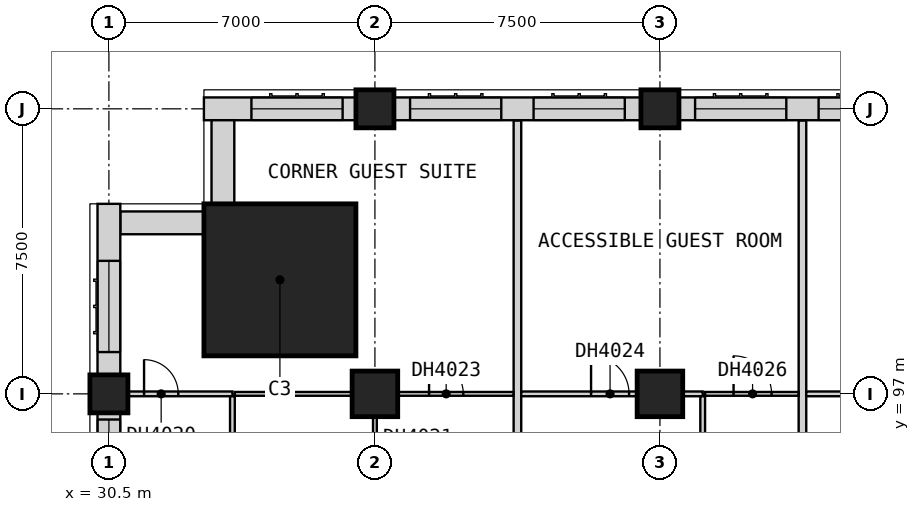
"""IFC4 building model, lengths in metres.
Left out: names, types, materials, properties, quantities, classifications, styles, units other than length and angle.
Written with IfcOpenShell. Run it as: python <this file> out.ifc"""

import sys

from ifc_helpers import new_model, si_unit, direction, frame, frame_2d, origin, origin_2d, place, context, subcontext, project, spatial, rectangle, extrude, element, fill, save


model = new_model("IFC4")
c1 = context("Model", 3, precision=1e-05, world=origin(), true_north=direction((0.0, 1.0)))
c2 = subcontext(c1, "Body", "Model", "MODEL_VIEW")
j1 = project(units=[si_unit("LENGTHUNIT", "METRE"), si_unit("PLANEANGLEUNIT", "RADIAN")], contexts=[c1])
p1 = place(None, origin())
s1 = spatial("IfcSite", under=j1, at=p1, CompositionType="ELEMENT")
p2 = place(p1, origin())
s2 = spatial("IfcBuilding", under=s1, at=p2, CompositionType="ELEMENT")
p3 = place(p2, frame((0.0, 0.0, 44.8)))
s3 = spatial("IfcBuildingStorey", under=s2, at=p3, CompositionType="ELEMENT", Elevation=44.8)
p4 = place(p3, frame((30.5, 97.0, 0.0), z_axis=(0.0, 0.0, 1.0), x_axis=(1.0, 0.0, 0.0)))
e1 = element("IfcColumn", 1, at=p4, inside=s3, PredefinedType="COLUMN", context=c2, shape_type="SweptSolid", body=[
    extrude(rectangle(XDim=1.0, YDim=1.0, at=origin_2d()), origin(), (0.0, 0.0, 1.0), 3.6),
])
p5 = place(p3, frame((37.5, 97.0, 0.0), z_axis=(0.0, 0.0, 1.0), x_axis=(1.0, 0.0, 0.0)))
e2 = element("IfcColumn", 2, at=p5, inside=s3, PredefinedType="COLUMN", context=c2, shape_type="SweptSolid", body=[
    extrude(rectangle(XDim=1.2, YDim=1.2, at=origin_2d()), origin(), (0.0, 0.0, 1.0), 3.6),
])
p6 = place(p3, frame((37.5, 104.5, 0.0), z_axis=(0.0, 0.0, 1.0), x_axis=(1.0, 0.0, 0.0)))
e3 = element("IfcColumn", 3, at=p6, inside=s3, PredefinedType="COLUMN", context=c2, shape_type="SweptSolid", body=[
    extrude(rectangle(XDim=1.0, YDim=1.0, at=origin_2d()), origin(), (0.0, 0.0, 1.0), 3.6),
])
p7 = place(p3, frame((45.0, 97.0, 0.0), z_axis=(0.0, 0.0, 1.0), x_axis=(1.0, 0.0, 0.0)))
e4 = element("IfcColumn", 4, at=p7, inside=s3, PredefinedType="COLUMN", context=c2, shape_type="SweptSolid", body=[
    extrude(rectangle(XDim=1.2, YDim=1.2, at=origin_2d()), origin(), (0.0, 0.0, 1.0), 3.6),
])
p8 = place(p3, frame((45.0, 104.5, 0.0), z_axis=(0.0, 0.0, 1.0), x_axis=(1.0, 0.0, 0.0)))
e5 = element("IfcColumn", 5, at=p8, inside=s3, PredefinedType="COLUMN", context=c2, shape_type="SweptSolid", body=[
    extrude(rectangle(XDim=1.0, YDim=1.0, at=origin_2d()), origin(), (0.0, 0.0, 1.0), 3.6),
])
p9 = place(p3, frame((35.0, 100.0, 0.0), z_axis=(0.0, 0.0, 1.0), x_axis=(1.0, 0.0, 0.0)))
e6 = element("IfcColumn", 6, at=p9, inside=s3, PredefinedType="COLUMN", context=c2, shape_type="SweptSolid", body=[
    extrude(rectangle(XDim=4.0, YDim=4.0, at=origin_2d()), origin(), (0.0, 0.0, 1.0), 3.6),
])
p10 = place(p3, frame((52.0, 104.5, 0.0), z_axis=(0.0, 0.0, 1.0), x_axis=(-1.0, 0.0, 0.0)))
e7 = element("IfcWall", 7, at=p10, inside=s3, PredefinedType="SOLIDWALL", context=c2, shape_type="SweptSolid", body=[
    extrude(rectangle(XDim=6.5, YDim=0.6, at=frame_2d((3.25, 0.0))), origin(), (0.0, 0.0, 1.0), 2.85),
])
p11 = place(p10, frame((3.675, 0.0, 0.8)))
e8 = element("IfcOpeningElement", 8, at=p11, cuts=e7, PredefinedType="OPENING", context=c2, shape_type="SweptSolid", body=[
    extrude(rectangle(XDim=2.4, YDim=1.8, at=frame_2d((1.2, 0.9))), frame((0.0, 0.31, 0.0), z_axis=(0.0, -1.0, 0.0), x_axis=(1.0, 0.0, 0.0)), (0.0, 0.0, 1.0), 0.62),
])
p12 = place(p10, frame((0.425, 0.0, 0.8)))
e9 = element("IfcOpeningElement", 9, at=p12, cuts=e7, PredefinedType="OPENING", context=c2, shape_type="SweptSolid", body=[
    extrude(rectangle(XDim=2.4, YDim=1.8, at=frame_2d((1.2, 0.9))), frame((0.0, 0.31, 0.0), z_axis=(0.0, -1.0, 0.0), x_axis=(1.0, 0.0, 0.0)), (0.0, 0.0, 1.0), 0.62),
])
p13 = place(p3, frame((44.5, 104.5, 0.0), z_axis=(0.0, 0.0, 1.0), x_axis=(-1.0, 0.0, 0.0)))
e10 = element("IfcWall", 10, at=p13, inside=s3, PredefinedType="SOLIDWALL", context=c2, shape_type="SweptSolid", body=[
    extrude(rectangle(XDim=6.5, YDim=0.6, at=frame_2d((3.25, 0.0))), origin(), (0.0, 0.0, 1.0), 2.85),
])
p14 = place(p13, frame((3.675, 0.0, 0.8)))
e11 = element("IfcOpeningElement", 11, at=p14, cuts=e10, PredefinedType="OPENING", context=c2, shape_type="SweptSolid", body=[
    extrude(rectangle(XDim=2.4, YDim=1.8, at=frame_2d((1.2, 0.9))), frame((0.0, 0.31, 0.0), z_axis=(0.0, -1.0, 0.0), x_axis=(1.0, 0.0, 0.0)), (0.0, 0.0, 1.0), 0.62),
])
p15 = place(p13, frame((0.425, 0.0, 0.8)))
e12 = element("IfcOpeningElement", 12, at=p15, cuts=e10, PredefinedType="OPENING", context=c2, shape_type="SweptSolid", body=[
    extrude(rectangle(XDim=2.4, YDim=1.8, at=frame_2d((1.2, 0.9))), frame((0.0, 0.31, 0.0), z_axis=(0.0, -1.0, 0.0), x_axis=(1.0, 0.0, 0.0)), (0.0, 0.0, 1.0), 0.62),
])
p16 = place(p3, frame((37.0, 104.5, 0.0), z_axis=(0.0, 0.0, 1.0), x_axis=(-1.0, 0.0, 0.0)))
e13 = element("IfcWall", 13, at=p16, inside=s3, PredefinedType="SOLIDWALL", context=c2, shape_type="SweptSolid", body=[
    extrude(rectangle(XDim=4.0, YDim=0.6, at=frame_2d((2.0, 0.0))), origin(), (0.0, 0.0, 1.0), 3.35),
])
p17 = place(p16, frame((0.35, 0.0, 0.8)))
e14 = element("IfcOpeningElement", 14, at=p17, cuts=e13, PredefinedType="OPENING", context=c2, shape_type="SweptSolid", body=[
    extrude(rectangle(XDim=2.4, YDim=1.8, at=frame_2d((1.2, 0.9))), frame((0.0, 0.31, 0.0), z_axis=(0.0, -1.0, 0.0), x_axis=(1.0, 0.0, 0.0)), (0.0, 0.0, 1.0), 0.62),
])
for number, where, z_axis, x_axis in (
    (15, (33.5, 104.2, 0.0), (0.0, 0.0, 1.0), (0.0, -1.0, 0.0)),
    (16, (33.0, 101.5, 0.0), (0.0, 0.0, 1.0), (-1.0, 0.0, 0.0)),
):
    element("IfcWall", number, at=place(p3, frame(where, z_axis=z_axis, x_axis=x_axis)), inside=s3, PredefinedType="SOLIDWALL", context=c2, shape_type="SweptSolid", body=[
        extrude(rectangle(XDim=2.2, YDim=0.6, at=frame_2d((1.1, 0.0))), origin(), (0.0, 0.0, 1.0), 3.35),
    ])
p18 = place(p3, frame((30.5, 102.0, 0.0), z_axis=(0.0, 0.0, 1.0), x_axis=(0.0, -1.0, 0.0)))
e17 = element("IfcWall", 17, at=p18, inside=s3, PredefinedType="SOLIDWALL", context=c2, shape_type="SweptSolid", body=[
    extrude(rectangle(XDim=4.5, YDim=0.6, at=frame_2d((2.25, 0.0))), origin(), (0.0, 0.0, 1.0), 3.35),
])
p19 = place(p18, frame((1.5, 0.0, 0.8)))
e18 = element("IfcOpeningElement", 18, at=p19, cuts=e17, PredefinedType="OPENING", context=c2, shape_type="SweptSolid", body=[
    extrude(rectangle(XDim=2.4, YDim=1.8, at=frame_2d((1.2, 0.9))), frame((0.0, 0.31, 0.0), z_axis=(0.0, -1.0, 0.0), x_axis=(1.0, 0.0, 0.0)), (0.0, 0.0, 1.0), 0.62),
])
p20 = place(p3, frame((30.5, 96.5, 0.0), z_axis=(0.0, 0.0, 1.0), x_axis=(0.0, -1.0, 0.0)))
e19 = element("IfcWall", 19, at=p20, inside=s3, PredefinedType="SOLIDWALL", context=c2, shape_type="SweptSolid", body=[
    extrude(rectangle(XDim=6.0, YDim=0.6, at=frame_2d((3.0, 0.0))), origin(), (0.0, 0.0, 1.0), 2.85),
])
p21 = place(p20, frame((3.175, 0.0, 0.8)))
e20 = element("IfcOpeningElement", 20, at=p21, cuts=e19, PredefinedType="OPENING", context=c2, shape_type="SweptSolid", body=[
    extrude(rectangle(XDim=2.4, YDim=1.8, at=frame_2d((1.2, 0.9))), frame((0.0, 0.31, 0.0), z_axis=(0.0, -1.0, 0.0), x_axis=(1.0, 0.0, 0.0)), (0.0, 0.0, 1.0), 0.62),
])
p22 = place(p20, frame((0.175, 0.0, 0.8)))
e21 = element("IfcOpeningElement", 21, at=p22, cuts=e19, PredefinedType="OPENING", context=c2, shape_type="SweptSolid", body=[
    extrude(rectangle(XDim=2.4, YDim=1.8, at=frame_2d((1.2, 0.9))), frame((0.0, 0.31, 0.0), z_axis=(0.0, -1.0, 0.0), x_axis=(1.0, 0.0, 0.0)), (0.0, 0.0, 1.0), 0.62),
])
for number, where, z_axis, x_axis in (
    (22, (41.25, 92.475, 0.0), (0.0, 0.0, 1.0), (0.0, 1.0, 0.0)),
    (23, (48.75, 92.475, 0.0), (0.0, 0.0, 1.0), (0.0, 1.0, 0.0)),
):
    element("IfcWall", number, at=place(p3, frame(where, z_axis=z_axis, x_axis=x_axis)), inside=s3, PredefinedType="PARTITIONING", context=c2, shape_type="SweptSolid", body=[
        extrude(rectangle(XDim=11.715, YDim=0.2, at=frame_2d((5.857, 0.0))), origin(), (0.0, 0.0, 1.0), 3.35),
    ])
p23 = place(p3, frame((33.812, 97.0, 0.0), z_axis=(0.0, 0.0, 1.0), x_axis=(1.0, 0.0, 0.0)))
e24 = element("IfcWall", 24, at=p23, inside=s3, PredefinedType="PARTITIONING", context=c2, shape_type="SweptSolid", body=[
    extrude(rectangle(XDim=7.337, YDim=0.1, at=frame_2d((3.669, 0.0))), origin(), (0.0, 0.0, 1.0), 3.35),
])
p24 = place(p23, frame((5.113, 0.0, 0.0)))
e25 = element("IfcOpeningElement", 25, at=p24, cuts=e24, PredefinedType="OPENING", context=c2, shape_type="SweptSolid", body=[
    extrude(rectangle(XDim=0.9, YDim=2.1, at=frame_2d((0.45, 1.05))), frame((0.0, 0.06, 0.0), z_axis=(0.0, -1.0, 0.0), x_axis=(1.0, 0.0, 0.0)), (0.0, 0.0, 1.0), 0.12),
])
p25 = place(p3, frame((46.188, 97.0, 0.0), z_axis=(0.0, 0.0, 1.0), x_axis=(1.0, 0.0, 0.0)))
e26 = element("IfcWall", 26, at=p25, inside=s3, PredefinedType="PARTITIONING", context=c2, shape_type="SweptSolid", body=[
    extrude(rectangle(XDim=2.462, YDim=0.1, at=frame_2d((1.231, 0.0))), origin(), (0.0, 0.0, 1.0), 3.35),
])
p26 = place(p25, frame((0.75, 0.0, 0.0)))
e27 = element("IfcOpeningElement", 27, at=p26, cuts=e26, PredefinedType="OPENING", context=c2, shape_type="SweptSolid", body=[
    extrude(rectangle(XDim=1.0, YDim=2.1, at=frame_2d((0.5, 1.05))), frame((0.0, 0.06, 0.0), z_axis=(0.0, -1.0, 0.0), x_axis=(1.0, 0.0, 0.0)), (0.0, 0.0, 1.0), 0.12),
])
p27 = place(p3, frame((37.5, 92.475, 0.0), z_axis=(0.0, 0.0, 1.0), x_axis=(0.0, 1.0, 0.0)))
e28 = element("IfcWall", 28, at=p27, inside=s3, PredefinedType="PARTITIONING", context=c2, shape_type="SweptSolid", body=[
    extrude(rectangle(XDim=4.475, YDim=0.1, at=frame_2d((2.237, 0.0))), origin(), (0.0, 0.0, 1.0), 3.35),
])
p28 = place(p27, frame((1.775, 0.0, 0.0)))
e29 = element("IfcOpeningElement", 29, at=p28, cuts=e28, PredefinedType="OPENING", context=c2, shape_type="SweptSolid", body=[
    extrude(rectangle(XDim=0.9, YDim=2.1, at=frame_2d((0.45, 1.05))), frame((0.0, 0.06, 0.0), z_axis=(0.0, -1.0, 0.0), x_axis=(1.0, 0.0, 0.0)), (0.0, 0.0, 1.0), 0.12),
])
p29 = place(p3, frame((30.0, 97.0, 0.0), z_axis=(0.0, 0.0, 1.0), x_axis=(1.0, 0.0, 0.0)))
e30 = element("IfcWall", 30, at=p29, inside=s3, PredefinedType="PARTITIONING", context=c2, shape_type="SweptSolid", body=[
    extrude(rectangle(XDim=3.75, YDim=0.125, at=frame_2d((1.875, 0.0))), origin(), (0.0, 0.0, 1.0), 3.35),
])
p30 = place(p29, frame((1.425, 0.0, 0.0)))
e31 = element("IfcOpeningElement", 31, at=p30, cuts=e30, PredefinedType="OPENING", context=c2, shape_type="SweptSolid", body=[
    extrude(rectangle(XDim=0.9, YDim=2.1, at=frame_2d((0.45, 1.05))), frame((0.0, 0.073, 0.0), z_axis=(0.0, -1.0, 0.0), x_axis=(1.0, 0.0, 0.0)), (0.0, 0.0, 1.0), 0.145),
])
p31 = place(p3, frame((41.35, 97.0, 0.0), z_axis=(0.0, 0.0, 1.0), x_axis=(1.0, 0.0, 0.0)))
e32 = element("IfcWall", 32, at=p31, inside=s3, PredefinedType="PARTITIONING", context=c2, shape_type="SweptSolid", body=[
    extrude(rectangle(XDim=4.775, YDim=0.125, at=frame_2d((2.387, 0.0))), origin(), (0.0, 0.0, 1.0), 3.35),
])
p32 = place(p31, frame((1.837, 0.0, 0.0)))
e33 = element("IfcOpeningElement", 33, at=p32, cuts=e32, PredefinedType="OPENING", context=c2, shape_type="SweptSolid", body=[
    extrude(rectangle(XDim=1.0, YDim=2.1, at=frame_2d((0.5, 1.05))), frame((0.0, 0.073, 0.0), z_axis=(0.0, -1.0, 0.0), x_axis=(1.0, 0.0, 0.0)), (0.0, 0.0, 1.0), 0.145),
])
p33 = place(p3, frame((48.85, 97.0, 0.0), z_axis=(0.0, 0.0, 1.0), x_axis=(1.0, 0.0, 0.0)))
e34 = element("IfcWall", 34, at=p33, inside=s3, PredefinedType="PARTITIONING", context=c2, shape_type="SweptSolid", body=[
    extrude(rectangle(XDim=4.4, YDim=0.125, at=frame_2d((2.2, 0.0))), origin(), (0.0, 0.0, 1.0), 3.35),
])
p34 = place(p33, frame((1.7, 0.0, 0.0)))
e35 = element("IfcOpeningElement", 35, at=p34, cuts=e34, PredefinedType="OPENING", context=c2, shape_type="SweptSolid", body=[
    extrude(rectangle(XDim=0.9, YDim=2.1, at=frame_2d((0.45, 1.05))), frame((0.0, 0.073, 0.0), z_axis=(0.0, -1.0, 0.0), x_axis=(1.0, 0.0, 0.0)), (0.0, 0.0, 1.0), 0.145),
])
for number, where, z_axis, x_axis in (
    (36, (33.75, 92.475, 0.0), (0.0, 0.0, 1.0), (0.0, 1.0, 0.0)),
    (37, (46.125, 92.475, 0.0), (0.0, 0.0, 1.0), (0.0, 1.0, 0.0)),
):
    element("IfcWall", number, at=place(p3, frame(where, z_axis=z_axis, x_axis=x_axis)), inside=s3, PredefinedType="PARTITIONING", context=c2, shape_type="SweptSolid", body=[
        extrude(rectangle(XDim=4.462, YDim=0.125, at=frame_2d((2.231, 0.0))), origin(), (0.0, 0.0, 1.0), 3.35),
    ])
p35 = place(p11, origin())
e38 = element("IfcWindow", 38, at=p35, inside=s3, PartitioningType="SINGLE_PANEL", PredefinedType="WINDOW", context=c2, shape_type="SweptSolid", body=[
    extrude(rectangle(XDim=2.4, YDim=1.8, at=frame_2d((1.2, 0.9))), frame((0.0, -0.07, 0.0), z_axis=(0.0, -1.0, 0.0), x_axis=(1.0, 0.0, 0.0)), (0.0, 0.0, 1.0), 0.06),
])
fill(e8, e38)
p36 = place(p12, origin())
e39 = element("IfcWindow", 39, at=p36, inside=s3, PartitioningType="SINGLE_PANEL", PredefinedType="WINDOW", context=c2, shape_type="SweptSolid", body=[
    extrude(rectangle(XDim=2.4, YDim=1.8, at=frame_2d((1.2, 0.9))), frame((0.0, -0.07, 0.0), z_axis=(0.0, -1.0, 0.0), x_axis=(1.0, 0.0, 0.0)), (0.0, 0.0, 1.0), 0.06),
])
fill(e9, e39)
p37 = place(p14, origin())
e40 = element("IfcWindow", 40, at=p37, inside=s3, PartitioningType="SINGLE_PANEL", PredefinedType="WINDOW", context=c2, shape_type="SweptSolid", body=[
    extrude(rectangle(XDim=2.4, YDim=1.8, at=frame_2d((1.2, 0.9))), frame((0.0, -0.07, 0.0), z_axis=(0.0, -1.0, 0.0), x_axis=(1.0, 0.0, 0.0)), (0.0, 0.0, 1.0), 0.06),
])
fill(e11, e40)
p38 = place(p15, origin())
e41 = element("IfcWindow", 41, at=p38, inside=s3, PartitioningType="SINGLE_PANEL", PredefinedType="WINDOW", context=c2, shape_type="SweptSolid", body=[
    extrude(rectangle(XDim=2.4, YDim=1.8, at=frame_2d((1.2, 0.9))), frame((0.0, -0.07, 0.0), z_axis=(0.0, -1.0, 0.0), x_axis=(1.0, 0.0, 0.0)), (0.0, 0.0, 1.0), 0.06),
])
fill(e12, e41)
p39 = place(p17, origin())
e42 = element("IfcWindow", 42, at=p39, inside=s3, PartitioningType="SINGLE_PANEL", PredefinedType="WINDOW", context=c2, shape_type="SweptSolid", body=[
    extrude(rectangle(XDim=2.4, YDim=1.8, at=frame_2d((1.2, 0.9))), frame((0.0, -0.07, 0.0), z_axis=(0.0, -1.0, 0.0), x_axis=(1.0, 0.0, 0.0)), (0.0, 0.0, 1.0), 0.06),
])
fill(e14, e42)
p40 = place(p19, origin())
e43 = element("IfcWindow", 43, at=p40, inside=s3, PartitioningType="SINGLE_PANEL", PredefinedType="WINDOW", context=c2, shape_type="SweptSolid", body=[
    extrude(rectangle(XDim=2.4, YDim=1.8, at=frame_2d((1.2, 0.9))), frame((0.0, -0.07, 0.0), z_axis=(0.0, -1.0, 0.0), x_axis=(1.0, 0.0, 0.0)), (0.0, 0.0, 1.0), 0.06),
])
fill(e18, e43)
p41 = place(p22, origin())
e44 = element("IfcWindow", 44, at=p41, inside=s3, PartitioningType="SINGLE_PANEL", PredefinedType="WINDOW", context=c2, shape_type="SweptSolid", body=[
    extrude(rectangle(XDim=2.4, YDim=1.8, at=frame_2d((1.2, 0.9))), frame((0.0, -0.07, 0.0), z_axis=(0.0, -1.0, 0.0), x_axis=(1.0, 0.0, 0.0)), (0.0, 0.0, 1.0), 0.06),
])
fill(e21, e44)
p42 = place(p30, origin())
e45 = element("IfcDoor", 45, at=p42, inside=s3, OperationType="SINGLE_SWING_RIGHT", PredefinedType="DOOR", context=c2, shape_type="SweptSolid", body=[
    extrude(rectangle(XDim=0.9, YDim=2.1, at=frame_2d((0.45, 1.05))), frame((0.0, 0.025, 0.0), z_axis=(0.0, -1.0, 0.0), x_axis=(1.0, 0.0, 0.0)), (0.0, 0.0, 1.0), 0.05),
])
fill(e31, e45)
p43 = place(p24, origin())
e46 = element("IfcDoor", 46, at=p43, inside=s3, OperationType="SINGLE_SWING_RIGHT", PredefinedType="DOOR", context=c2, shape_type="SweptSolid", body=[
    extrude(rectangle(XDim=0.9, YDim=2.1, at=frame_2d((0.45, 1.05))), frame((0.0, 0.025, 0.0), z_axis=(0.0, -1.0, 0.0), x_axis=(1.0, 0.0, 0.0)), (0.0, 0.0, 1.0), 0.05),
])
fill(e25, e46)
p44 = place(p32, origin())
e47 = element("IfcDoor", 47, at=p44, inside=s3, OperationType="SINGLE_SWING_RIGHT", PredefinedType="DOOR", context=c2, shape_type="SweptSolid", body=[
    extrude(rectangle(XDim=1.0, YDim=2.1, at=frame_2d((0.5, 1.05))), frame((0.0, 0.025, 0.0), z_axis=(0.0, -1.0, 0.0), x_axis=(1.0, 0.0, 0.0)), (0.0, 0.0, 1.0), 0.05),
])
fill(e33, e47)
p45 = place(p26, origin())
e48 = element("IfcDoor", 48, at=p45, inside=s3, OperationType="SINGLE_SWING_RIGHT", PredefinedType="DOOR", context=c2, shape_type="SweptSolid", body=[
    extrude(rectangle(XDim=1.0, YDim=2.1, at=frame_2d((0.5, 1.05))), frame((0.0, 0.025, 0.0), z_axis=(0.0, -1.0, 0.0), x_axis=(1.0, 0.0, 0.0)), (0.0, 0.0, 1.0), 0.05),
])
fill(e27, e48)
save(model, sys.argv[1])
